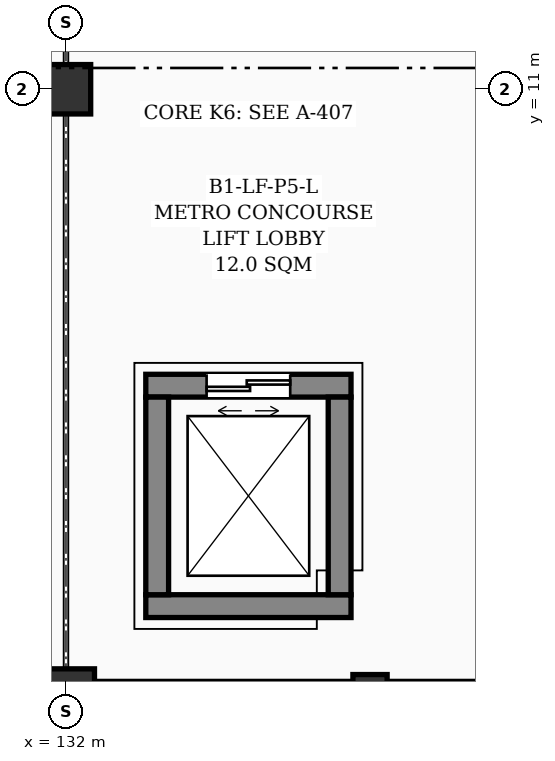
"""IFC4 building model, lengths in metres.
Left out: names, types, materials, properties, quantities, classifications, styles, units other than length and angle.
Written with IfcOpenShell. Run it as: python <this file> out.ifc"""

import sys

from ifc_helpers import new_model, si_unit, direction, frame, frame_2d, origin, origin_2d, place, context, subcontext, project, spatial, rectangle, circle, extrude, element, fill, save


model = new_model("IFC4")
c1 = context("Model", 3, precision=1e-05, world=origin(), true_north=direction((0.0, 1.0)))
c2 = subcontext(c1, "Body", "Model", "MODEL_VIEW")
j1 = project(units=[si_unit("LENGTHUNIT", "METRE"), si_unit("PLANEANGLEUNIT", "RADIAN")], contexts=[c1])
p1 = place(None, origin())
s1 = spatial("IfcSite", under=j1, at=p1, CompositionType="ELEMENT")
p2 = place(p1, origin())
s2 = spatial("IfcBuilding", under=s1, at=p2, CompositionType="ELEMENT")
p3 = place(p2, frame((0.0, 0.0, -4.8)))
s3 = spatial("IfcBuildingStorey", under=s2, at=p3, CompositionType="ELEMENT", Elevation=-4.8)
p4 = place(p3, frame((132.0, 3.0, -0.38), z_axis=(0.0, 0.0, 1.0), x_axis=(1.0, 0.0, 0.0)))
e1 = element("IfcColumn", 1, at=p4, inside=s3, PredefinedType="COLUMN", context=c2, shape_type="SweptSolid", body=[
    extrude(circle(Radius=0.375, at=origin_2d()), origin(), (0.0, 0.0, 1.0), 5.18),
])
p5 = place(p3, frame((132.0, 11.0, -0.38), z_axis=(0.0, 0.0, 1.0), x_axis=(1.0, 0.0, 0.0)))
e2 = element("IfcColumn", 2, at=p5, inside=s3, PredefinedType="COLUMN", context=c2, shape_type="SweptSolid", body=[
    extrude(rectangle(XDim=0.65, YDim=0.65, at=origin_2d()), origin(), (0.0, 0.0, 1.0), 5.18),
])
p6 = place(p3, frame((136.0, 3.0, -0.38), z_axis=(0.0, 0.0, 1.0), x_axis=(1.0, 0.0, 0.0)))
e3 = element("IfcColumn", 3, at=p6, inside=s3, PredefinedType="PILASTER", context=c2, shape_type="SweptSolid", body=[
    extrude(rectangle(XDim=0.45, YDim=0.6, at=origin_2d()), origin(), (0.0, 0.0, 1.0), 5.18),
])
p7 = place(p3, frame((133.05, 4.2, -1.2), z_axis=(0.0, 0.0, 1.0), x_axis=(1.0, 0.0, 0.0)))
e4 = element("IfcWall", 4, at=p7, inside=s3, PredefinedType="SHEAR", context=c2, shape_type="SweptSolid", body=[
    extrude(rectangle(XDim=2.7, YDim=0.3, at=frame_2d((1.35, 0.0))), origin(), (0.0, 0.0, 1.0), 5.7),
])
p8 = place(p3, frame((135.75, 7.1, -1.2), z_axis=(0.0, 0.0, 1.0), x_axis=(-1.0, 0.0, 0.0)))
e5 = element("IfcWall", 5, at=p8, inside=s3, PredefinedType="SHEAR", context=c2, shape_type="SweptSolid", body=[
    extrude(rectangle(XDim=2.7, YDim=0.3, at=frame_2d((1.35, 0.0))), origin(), (0.0, 0.0, 1.0), 5.7),
])
p9 = place(p8, frame((0.8, 0.0, 1.2)))
e6 = element("IfcOpeningElement", 6, at=p9, cuts=e5, PredefinedType="OPENING", context=c2, shape_type="SweptSolid", body=[
    extrude(rectangle(XDim=1.1, YDim=2.15, at=frame_2d((0.55, 1.075))), frame((0.0, 0.16, 0.0), z_axis=(0.0, -1.0, 0.0), x_axis=(1.0, 0.0, 0.0)), (0.0, 0.0, 1.0), 0.32),
])
for number, where, z_axis, x_axis in (
    (7, (133.2, 4.35, -1.2), (0.0, 0.0, 1.0), (0.0, 1.0, 0.0)),
    (8, (135.6, 6.95, -1.2), (0.0, 0.0, 1.0), (0.0, -1.0, 0.0)),
):
    element("IfcWall", number, at=place(p3, frame(where, z_axis=z_axis, x_axis=x_axis)), inside=s3, PredefinedType="SHEAR", context=c2, shape_type="SweptSolid", body=[
        extrude(rectangle(XDim=2.6, YDim=0.3, at=frame_2d((1.3, 0.0))), origin(), (0.0, 0.0, 1.0), 5.7),
    ])
p10 = place(p9, origin())
e9 = element("IfcDoor", 9, at=p10, inside=s3, OperationType="DOUBLE_DOOR_SLIDING", PredefinedType="DOOR", context=c2, shape_type="SweptSolid", body=[
    extrude(rectangle(XDim=1.1, YDim=2.15, at=frame_2d((0.55, 1.075))), frame((0.0, 0.025, 0.0), z_axis=(0.0, -1.0, 0.0), x_axis=(1.0, 0.0, 0.0)), (0.0, 0.0, 1.0), 0.05),
])
fill(e6, e9)
save(model, sys.argv[1])
